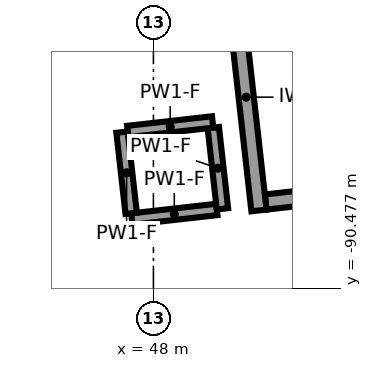
"""IFC4 building model, lengths in metres.
Left out: names, types, materials, properties, quantities, classifications, styles, units other than length and angle.
Written with IfcOpenShell. Run it as: python <this file> out.ifc"""

import sys

from ifc_helpers import new_model, si_unit, direction, frame, frame_2d, origin, place, context, subcontext, project, spatial, rectangle, extrude, element, save


model = new_model("IFC4")
c1 = context("Model", 3, precision=1e-05, world=origin(), true_north=direction((0.0, 1.0)))
c2 = subcontext(c1, "Body", "Model", "MODEL_VIEW")
j1 = project(units=[si_unit("LENGTHUNIT", "METRE"), si_unit("PLANEANGLEUNIT", "RADIAN")], contexts=[c1])
p1 = place(None, origin())
s1 = spatial("IfcSite", under=j1, at=p1, CompositionType="ELEMENT")
p2 = place(p1, origin())
s2 = spatial("IfcBuilding", under=s1, at=p2, CompositionType="ELEMENT")
p3 = place(p2, frame((0.0, 0.0, 18.0)))
s3 = spatial("IfcBuildingStorey", under=s2, at=p3, CompositionType="ELEMENT", Elevation=18.0)
p4 = place(p3, frame((49.389, -89.454, 0.0), z_axis=(0.0, 0.0, 1.0), x_axis=(-0.111976588553, 0.993710845073, 0.0)))
e1 = element("IfcWall", 1, at=p4, inside=s3, PredefinedType="SHEAR", context=c2, shape_type="SweptSolid", body=[
    extrude(rectangle(XDim=3.0, YDim=0.2, at=frame_2d((1.5, 0.0))), origin(), (0.0, 0.0, 1.0), 4.6),
])
p5 = place(p3, frame((49.477, -89.343, 0.0), z_axis=(0.0, 0.0, 1.0), x_axis=(0.993718105662, 0.11191213732, 0.0)))
e2 = element("IfcWall", 2, at=p5, inside=s3, PredefinedType="SHEAR", context=c2, shape_type="SweptSolid", body=[
    extrude(rectangle(XDim=1.9, YDim=0.2, at=frame_2d((0.95, 0.0))), origin(), (0.0, 0.0, 1.0), 4.6),
])
p6 = place(p3, frame((47.716, -89.567, 0.0), z_axis=(0.0, 0.0, 1.0), x_axis=(0.993710504932, 0.11197960702, 0.0)))
e3 = element("IfcWall", 3, at=p6, inside=s3, PredefinedType="PARTITIONING", context=c2, shape_type="SweptSolid", body=[
    extrude(rectangle(XDim=1.125, YDim=0.15, at=frame_2d((0.562, 0.0))), origin(), (0.0, 0.0, 1.0), 2.914),
])
p7 = place(p3, frame((48.908, -89.432, 0.0), z_axis=(0.0, 0.0, 1.0), x_axis=(-0.111951742856, 0.993713644503, 0.0)))
e4 = element("IfcWall", 4, at=p7, inside=s3, PredefinedType="PARTITIONING", context=c2, shape_type="SweptSolid", body=[
    extrude(rectangle(XDim=1.075, YDim=0.15, at=frame_2d((0.538, 0.0))), origin(), (0.0, 0.0, 1.0), 2.914),
])
p8 = place(p3, frame((48.78, -88.29, 0.0), z_axis=(0.0, 0.0, 1.0), x_axis=(-0.993710504932, -0.11197960702, 0.0)))
e5 = element("IfcWall", 5, at=p8, inside=s3, PredefinedType="PARTITIONING", context=c2, shape_type="SweptSolid", body=[
    extrude(rectangle(XDim=1.125, YDim=0.15, at=frame_2d((0.562, 0.0))), origin(), (0.0, 0.0, 1.0), 2.914),
])
p9 = place(p3, frame((47.587, -88.424, 0.0), z_axis=(0.0, 0.0, 1.0), x_axis=(0.111951742856, -0.993713644503, 0.0)))
e6 = element("IfcWall", 6, at=p9, inside=s3, PredefinedType="PARTITIONING", context=c2, shape_type="SweptSolid", body=[
    extrude(rectangle(XDim=1.075, YDim=0.15, at=frame_2d((0.538, 0.0))), origin(), (0.0, 0.0, 1.0), 2.914),
])
save(model, sys.argv[1])
